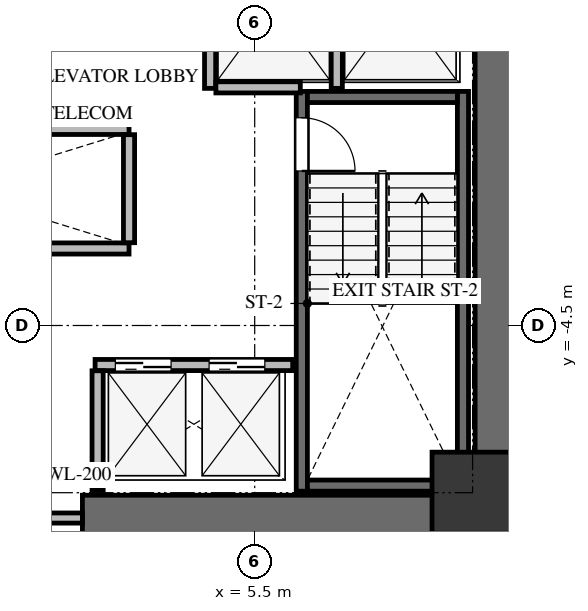
"""IFC4 building model, lengths in metres.
Left out: names, types, materials, properties, quantities, classifications, styles, units other than length and angle.
Written with IfcOpenShell. Run it as: python <this file> out.ifc"""

import sys

from ifc_helpers import new_model, si_unit, direction, frame, frame_2d, origin, origin_2d, place, context, subcontext, project, spatial, rectangle, extrude, source, transform, mapped, element, fill, save


model = new_model("IFC4")
c1 = context("Model", 3, precision=1e-05, world=origin(), true_north=direction((0.0, 1.0)))
c2 = subcontext(c1, "Body", "Model", "MODEL_VIEW")
j1 = project(units=[si_unit("LENGTHUNIT", "METRE"), si_unit("PLANEANGLEUNIT", "RADIAN")], contexts=[c1])
p1 = place(None, origin())
s1 = spatial("IfcSite", under=j1, at=p1, CompositionType="ELEMENT")
p2 = place(p1, origin())
s2 = spatial("IfcBuilding", under=s1, at=p2, CompositionType="ELEMENT")
p3 = place(p2, frame((0.0, 0.0, 39.0)))
s3 = spatial("IfcBuildingStorey", under=s2, at=p3, CompositionType="ELEMENT", Elevation=39.0)
p4 = place(p3, frame((10.3, -8.75, 0.0), z_axis=(0.0, 0.0, 1.0), x_axis=(0.0, 1.0, 0.0)))
e1 = element("IfcWall", 1, at=p4, inside=s3, PredefinedType="SHEAR", context=c2, shape_type="SweptSolid", body=[
    extrude(rectangle(XDim=17.5, YDim=0.9, at=frame_2d((8.75, 0.0))), origin(), (0.0, 0.0, 1.0), 3.3),
])
p5 = place(p3, frame((2.1, -8.3, 0.0), z_axis=(0.0, 0.0, 1.0), x_axis=(1.0, 0.0, 0.0)))
e2 = element("IfcWall", 2, at=p5, inside=s3, PredefinedType="SHEAR", context=c2, shape_type="SweptSolid", body=[
    extrude(rectangle(XDim=7.75, YDim=0.9, at=frame_2d((3.875, 0.0))), origin(), (0.0, 0.0, 1.0), 3.3),
])
p6 = place(p3, frame((9.61, -7.77, -0.24), z_axis=(0.0, 0.0, 1.0), x_axis=(0.0, 1.0, 0.0)))
e3 = element("IfcWall", 3, at=p6, inside=s3, PredefinedType="SHEAR", context=c2, shape_type="SweptSolid", body=[
    extrude(rectangle(XDim=7.89, YDim=0.22, at=frame_2d((3.945, 0.0))), origin(), (0.0, 0.0, 1.0), 3.3),
])
p7 = place(p3, frame((6.43, 0.12, -0.24), z_axis=(0.0, 0.0, 1.0), x_axis=(0.0, -1.0, 0.0)))
e4 = element("IfcWall", 4, at=p7, inside=s3, PredefinedType="SHEAR", context=c2, shape_type="SweptSolid", body=[
    extrude(rectangle(XDim=7.89, YDim=0.22, at=frame_2d((3.945, 0.0))), origin(), (0.0, 0.0, 1.0), 3.3),
])
p8 = place(p7, frame((0.52, 0.0, 0.0)))
e5 = element("IfcOpeningElement", 5, at=p8, cuts=e4, PredefinedType="OPENING", context=c2, shape_type="SweptSolid", body=[
    extrude(rectangle(XDim=1.05, YDim=2.15, at=frame_2d((0.525, 1.075))), frame((0.0, 0.12, 0.0), z_axis=(0.0, -1.0, 0.0), x_axis=(1.0, 0.0, 0.0)), (0.0, 0.0, 1.0), 0.24),
])
for number, where, z_axis, x_axis in (
    (6, (6.54, -7.66, -0.24), (0.0, 0.0, 1.0), (1.0, 0.0, 0.0)),
    (7, (9.5, 0.01, -0.24), (0.0, 0.0, 1.0), (-1.0, 0.0, 0.0)),
):
    element("IfcWall", number, at=place(p3, frame(where, z_axis=z_axis, x_axis=x_axis)), inside=s3, PredefinedType="SHEAR", context=c2, shape_type="SweptSolid", body=[
        extrude(rectangle(XDim=2.96, YDim=0.22, at=frame_2d((1.48, 0.0))), origin(), (0.0, 0.0, 1.0), 3.3),
    ])
m1 = source(origin(), c2, "Body", "SweptSolid", [
    extrude(rectangle(XDim=1.6, YDim=1.6, at=origin_2d()), origin(), (0.0, 0.0, 1.0), 3.3),
])
p9 = place(p3, frame((9.8, -7.8, -0.24), z_axis=(0.0, 0.0, 1.0), x_axis=(1.0, 0.0, 0.0)))
e8 = element("IfcColumn", 8, at=p9, inside=s3, PredefinedType="COLUMN", context=c2, shape_type="MappedRepresentation", body=[
    mapped(m1, transform((0.0, 0.0, 0.0), x_axis=(1.0, 0.0, 0.0), y_axis=(0.0, 1.0, 0.0), z_axis=(0.0, 0.0, 1.0), scale=1.0)),
])
p10 = place(p3, frame((-2.1, -8.3, 0.0), z_axis=(0.0, 0.0, 1.0), x_axis=(1.0, 0.0, 0.0)))
e9 = element("IfcWall", 9, at=p10, inside=s3, PredefinedType="SOLIDWALL", context=c2, shape_type="SweptSolid", body=[
    extrude(rectangle(XDim=4.2, YDim=0.2, at=frame_2d((2.1, 0.0))), origin(), (0.0, 0.0, 1.0), 3.045),
])
p11 = place(p10, frame((1.2, 0.0, 0.0)))
e10 = element("IfcOpeningElement", 10, at=p11, cuts=e9, PredefinedType="OPENING", context=c2, shape_type="SweptSolid", body=[
    extrude(rectangle(XDim=1.8, YDim=2.15, at=frame_2d((0.9, 1.075))), frame((0.0, 0.11, 0.0), z_axis=(0.0, -1.0, 0.0), x_axis=(1.0, 0.0, 0.0)), (0.0, 0.0, 1.0), 0.22),
])
for number, where, z_axis, x_axis in (
    (11, (4.62, 0.18, 0.0), (0.0, 0.0, 1.0), (0.0, 1.0, 0.0)),
    (12, (7.12, 0.18, 0.0), (0.0, 0.0, 1.0), (0.0, 1.0, 0.0)),
):
    element("IfcWall", number, at=place(p3, frame(where, z_axis=z_axis, x_axis=x_axis)), inside=s3, PredefinedType="SOLIDWALL", context=c2, shape_type="SweptSolid", body=[
        extrude(rectangle(XDim=3.186, YDim=0.22, at=frame_2d((1.593, 0.0))), origin(), (0.0, 0.0, 1.0), 3.045),
    ])
p12 = place(p3, frame((4.734, 0.2, 0.0), z_axis=(0.0, 0.0, 1.0), x_axis=(1.0, 0.0, 0.0)))
e13 = element("IfcWall", 13, at=p12, inside=s3, PredefinedType="SOLIDWALL", context=c2, shape_type="SweptSolid", body=[
    extrude(rectangle(XDim=1.666, YDim=0.22, at=frame_2d((0.833, 0.0))), origin(), (0.0, 0.0, 1.0), 3.045),
])
p13 = place(p3, frame((2.35, -5.28, 0.0), z_axis=(0.0, 0.0, 1.0), x_axis=(1.0, 0.0, 0.0)))
e14 = element("IfcWall", 14, at=p13, inside=s3, PredefinedType="SOLIDWALL", context=c2, shape_type="SweptSolid", body=[
    extrude(rectangle(XDim=3.9, YDim=0.22, at=frame_2d((1.95, 0.0))), origin(), (0.0, 0.0, 1.0), 3.045),
])
p14 = place(p13, frame((0.4, 0.0, 0.0)))
e15 = element("IfcOpeningElement", 15, at=p14, cuts=e14, PredefinedType="OPENING", context=c2, shape_type="SweptSolid", body=[
    extrude(rectangle(XDim=1.1, YDim=2.15, at=frame_2d((0.55, 1.075))), frame((0.0, 0.12, 0.0), z_axis=(0.0, -1.0, 0.0), x_axis=(1.0, 0.0, 0.0)), (0.0, 0.0, 1.0), 0.24),
])
p15 = place(p13, frame((2.25, 0.0, 0.0)))
e16 = element("IfcOpeningElement", 16, at=p15, cuts=e14, PredefinedType="OPENING", context=c2, shape_type="SweptSolid", body=[
    extrude(rectangle(XDim=1.1, YDim=2.15, at=frame_2d((0.55, 1.075))), frame((0.0, 0.12, 0.0), z_axis=(0.0, -1.0, 0.0), x_axis=(1.0, 0.0, 0.0)), (0.0, 0.0, 1.0), 0.24),
])
p16 = place(p3, frame((2.4, -7.75, 0.0), z_axis=(0.0, 0.0, 1.0), x_axis=(0.0, 1.0, 0.0)))
e17 = element("IfcWall", 17, at=p16, inside=s3, PredefinedType="SOLIDWALL", context=c2, shape_type="SweptSolid", body=[
    extrude(rectangle(XDim=2.356, YDim=0.22, at=frame_2d((1.178, 0.0))), origin(), (0.0, 0.0, 1.0), 3.045),
])
for number, where, z_axis, x_axis in (
    (18, (-4.22, -2.98, 0.0), (0.0, 0.0, 1.0), (1.0, 0.0, 0.0)),
    (19, (-4.22, -0.62, 0.0), (0.0, 0.0, 1.0), (1.0, 0.0, 0.0)),
):
    element("IfcWall", number, at=place(p3, frame(where, z_axis=z_axis, x_axis=x_axis)), inside=s3, PredefinedType="SOLIDWALL", context=c2, shape_type="SweptSolid", body=[
        extrude(rectangle(XDim=7.24, YDim=0.22, at=frame_2d((3.62, 0.0))), origin(), (0.0, 0.0, 1.0), 3.045),
    ])
p17 = place(p3, frame((3.02, -2.866, 0.0), z_axis=(0.0, 0.0, 1.0), x_axis=(0.0, 1.0, 0.0)))
e20 = element("IfcWall", 20, at=p17, inside=s3, PredefinedType="SOLIDWALL", context=c2, shape_type="SweptSolid", body=[
    extrude(rectangle(XDim=2.132, YDim=0.22, at=frame_2d((1.066, 0.0))), origin(), (0.0, 0.0, 1.0), 3.045),
])
m2 = source(origin(), c2, "Body", "SweptSolid", [
    extrude(rectangle(XDim=1.05, YDim=2.15, at=frame_2d((0.525, 1.075))), frame((0.0, 0.025, 0.0), z_axis=(0.0, -1.0, 0.0), x_axis=(1.0, 0.0, 0.0)), (0.0, 0.0, 1.0), 0.05),
])
p18 = place(p8, origin())
e21 = element("IfcDoor", 21, at=p18, inside=s3, OperationType="SINGLE_SWING_RIGHT", PredefinedType="DOOR", context=c2, shape_type="MappedRepresentation", body=[
    mapped(m2, transform((0.0, 0.0, 0.0), x_axis=(1.0, 0.0, 0.0), y_axis=(0.0, 1.0, 0.0), z_axis=(0.0, 0.0, 1.0), scale=1.0)),
])
fill(e5, e21)
m3 = source(origin(), c2, "Body", "SweptSolid", [
    extrude(rectangle(XDim=1.1, YDim=2.15, at=frame_2d((0.55, 1.075))), frame((0.0, 0.025, 0.0), z_axis=(0.0, -1.0, 0.0), x_axis=(1.0, 0.0, 0.0)), (0.0, 0.0, 1.0), 0.05),
])
p19 = place(p14, origin())
e22 = element("IfcDoor", 22, at=p19, inside=s3, OperationType="DOUBLE_DOOR_SLIDING", PredefinedType="DOOR", context=c2, shape_type="MappedRepresentation", body=[
    mapped(m3, transform((0.0, 0.0, 0.0), x_axis=(1.0, 0.0, 0.0), y_axis=(0.0, 1.0, 0.0), z_axis=(0.0, 0.0, 1.0), scale=1.0)),
])
fill(e15, e22)
p20 = place(p15, origin())
e23 = element("IfcDoor", 23, at=p20, inside=s3, OperationType="DOUBLE_DOOR_SLIDING", PredefinedType="DOOR", context=c2, shape_type="MappedRepresentation", body=[
    mapped(m3, transform((0.0, 0.0, 0.0), x_axis=(1.0, 0.0, 0.0), y_axis=(0.0, 1.0, 0.0), z_axis=(0.0, 0.0, 1.0), scale=1.0)),
])
fill(e16, e23)
save(model, sys.argv[1])
